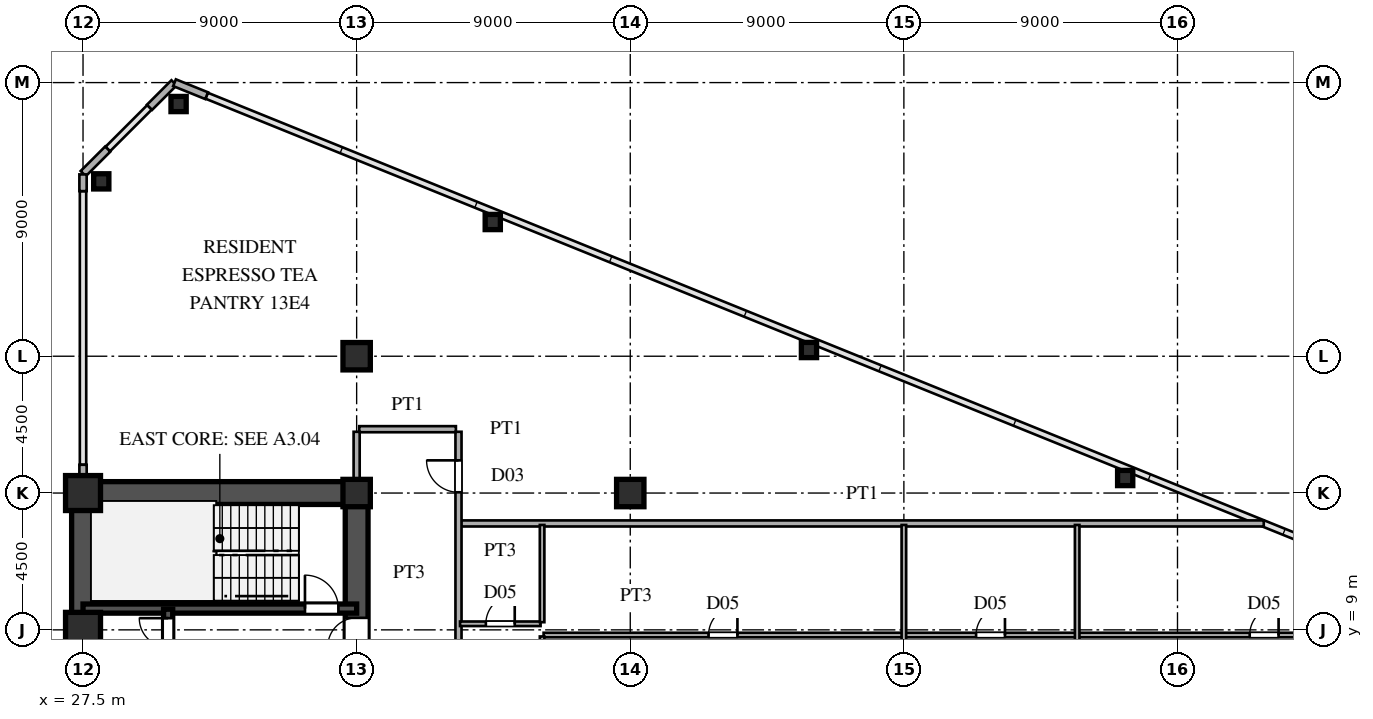
"""IFC4 building model, lengths in metres.
Left out: names, types, materials, properties, quantities, classifications, styles, units other than length and angle.
Written with IfcOpenShell. Run it as: python <this file> out.ifc"""

import sys

from ifc_helpers import new_model, si_unit, direction, frame, frame_2d, origin, origin_2d, place, context, subcontext, project, spatial, rectangle, hollow_rectangle, i_section, extrude, source, transform, mapped, element, fill, save


model = new_model("IFC4")
c1 = context("Model", 3, precision=1e-05, world=origin(), true_north=direction((0.0, 1.0)))
c2 = subcontext(c1, "Body", "Model", "MODEL_VIEW")
j1 = project(units=[si_unit("LENGTHUNIT", "METRE"), si_unit("PLANEANGLEUNIT", "RADIAN")], contexts=[c1])
p1 = place(None, origin())
s1 = spatial("IfcSite", under=j1, at=p1, CompositionType="ELEMENT")
p2 = place(p1, origin())
s2 = spatial("IfcBuilding", under=s1, at=p2, CompositionType="ELEMENT")
p3 = place(p2, frame((0.0, 0.0, 51.3)))
s3 = spatial("IfcBuildingStorey", under=s2, at=p3, CompositionType="ELEMENT", Elevation=51.3)
m1 = source(origin(), c2, "Body", "SweptSolid", [
    extrude(hollow_rectangle(XDim=1.15, YDim=1.15, WallThickness=0.048, at=origin_2d()), origin(), (0.0, 0.0, 1.0), 3.6),
])
for number, where, z_axis, x_axis in (
    (1, (27.5, 9.0, 0.0), (0.0, 0.0, 1.0), (1.0, 0.0, 0.0)),
    (2, (27.5, 13.5, 0.0), (0.0, 0.0, 1.0), (1.0, 0.0, 0.0)),
):
    element("IfcColumn", number, at=place(p3, frame(where, z_axis=z_axis, x_axis=x_axis)), inside=s3, PredefinedType="COLUMN", context=c2, shape_type="MappedRepresentation", body=[
        mapped(m1, transform((0.0, 0.0, 0.0), scale=1.0)),
    ])
m2 = source(origin(), c2, "Body", "SweptSolid", [
    extrude(i_section(OverallWidth=0.9, OverallDepth=0.9, WebThickness=0.036, FlangeThickness=0.055, at=origin_2d()), origin(), (0.0, 0.0, 1.0), 3.6),
])
for number, where, z_axis, x_axis in (
    (3, (36.5, 13.5, 0.0), (0.0, 0.0, 1.0), (1.0, 0.0, 0.0)),
    (4, (36.5, 18.0, 0.0), (0.0, 0.0, 1.0), (1.0, 0.0, 0.0)),
    (5, (45.5, 13.5, 0.0), (0.0, 0.0, 1.0), (1.0, 0.0, 0.0)),
):
    element("IfcColumn", number, at=place(p3, frame(where, z_axis=z_axis, x_axis=x_axis)), inside=s3, PredefinedType="COLUMN", context=c2, shape_type="MappedRepresentation", body=[
        mapped(m2, transform((0.0, 0.0, 0.0), scale=1.0)),
    ])
m3 = source(origin(), c2, "Body", "SweptSolid", [
    extrude(hollow_rectangle(XDim=0.5, YDim=0.5, WallThickness=0.02, at=origin_2d()), origin(), (0.0, 0.0, 1.0), 3.6),
])
for number, where, z_axis, x_axis in (
    (6, (30.643, 26.295, 0.0), (0.0, 0.0, 1.0), (1.0, 0.0, 0.0)),
    (7, (28.1, 23.751, 0.0), (0.0, 0.0, 1.0), (1.0, 0.0, 0.0)),
    (8, (40.977, 22.414, 0.0), (0.0, 0.0, 1.0), (1.0, 0.0, 0.0)),
    (9, (51.378, 18.204, 0.0), (0.0, 0.0, 1.0), (1.0, 0.0, 0.0)),
    (10, (61.779, 13.994, 0.0), (0.0, 0.0, 1.0), (1.0, 0.0, 0.0)),
):
    element("IfcColumn", number, at=place(p3, frame(where, z_axis=z_axis, x_axis=x_axis)), inside=s3, PredefinedType="COLUMN", context=c2, shape_type="MappedRepresentation", body=[
        mapped(m3, transform((0.0, 0.0, 0.0), scale=1.0)),
    ])
p4 = place(p3, frame((31.566, 26.569, 0.0), z_axis=(0.0, 0.0, 1.0), x_axis=(-0.927007103665, 0.375043770452, 0.0)))
e11 = element("IfcWall", 11, at=p4, inside=s3, PredefinedType="SOLIDWALL", context=c2, shape_type="SweptSolid", body=[
    extrude(rectangle(XDim=1.14, YDim=0.24, at=frame_2d((0.57, 0.0))), origin(), (0.0, 0.0, 1.0), 3.38),
])
for number, where, z_axis, x_axis in (
    (12, (30.493, 26.993, 0.0), (0.0, 0.0, 1.0), (-0.707, -0.707, 0.0)),
    (13, (28.313, 24.813, 0.0), (0.0, 0.0, 1.0), (-0.707, -0.707, 0.0)),
):
    element("IfcWall", number, at=place(p3, frame(where, z_axis=z_axis, x_axis=x_axis)), inside=s3, PredefinedType="SOLIDWALL", context=c2, shape_type="SweptSolid", body=[
        extrude(rectangle(XDim=1.14, YDim=0.24, at=frame_2d((0.57, 0.0))), origin(), (0.0, 0.0, 1.0), 3.38),
    ])
p5 = place(p3, frame((27.5, 13.88, 0.0), z_axis=(0.0, 0.0, 1.0), x_axis=(0.0, 1.0, 0.0)))
e14 = element("IfcWall", 14, at=p5, inside=s3, PredefinedType="SOLIDWALL", context=c2, shape_type="SweptSolid", body=[
    extrude(rectangle(XDim=0.55, YDim=0.24, at=frame_2d((0.275, 0.0))), origin(), (0.0, 0.0, 1.0), 2.88),
])
p6 = place(p3, frame((27.5, 23.43, 0.0), z_axis=(0.0, 0.0, 1.0), x_axis=(0.0, 1.0, 0.0)))
e15 = element("IfcWall", 15, at=p6, inside=s3, PredefinedType="SOLIDWALL", context=c2, shape_type="SweptSolid", body=[
    extrude(rectangle(XDim=0.55, YDim=0.24, at=frame_2d((0.275, 0.0))), origin(), (0.0, 0.0, 1.0), 3.38),
])
p7 = place(p3, frame((27.5, 1.3, 0.0), z_axis=(0.0, 0.0, 1.0), x_axis=(0.0, 1.0, 0.0)))
e16 = element("IfcWall", 16, at=p7, inside=s3, PredefinedType="SHEAR", context=c2, shape_type="SweptSolid", body=[
    extrude(rectangle(XDim=12.2, YDim=0.75, at=frame_2d((6.1, 0.0))), origin(), (0.0, 0.0, 1.0), 3.38),
])
p8 = place(p3, frame((27.5, 13.5, 0.0), z_axis=(0.0, 0.0, 1.0), x_axis=(1.0, 0.0, 0.0)))
e17 = element("IfcWall", 17, at=p8, inside=s3, PredefinedType="SHEAR", context=c2, shape_type="SweptSolid", body=[
    extrude(rectangle(XDim=9.0, YDim=0.75, at=frame_2d((4.5, 0.0))), origin(), (0.0, 0.0, 1.0), 3.38),
])
p9 = place(p3, frame((36.5, 8.2, 0.0), z_axis=(0.0, 0.0, 1.0), x_axis=(0.0, 1.0, 0.0)))
e18 = element("IfcWall", 18, at=p9, inside=s3, PredefinedType="SHEAR", context=c2, shape_type="SweptSolid", body=[
    extrude(rectangle(XDim=5.45, YDim=0.75, at=frame_2d((2.725, 0.0))), origin(), (0.0, 0.0, 1.0), 3.38),
])
p10 = place(p9, frame((0.245, 0.0, 0.0)))
e19 = element("IfcOpeningElement", 19, at=p10, cuts=e18, PredefinedType="OPENING", context=c2, shape_type="SweptSolid", body=[
    extrude(rectangle(XDim=0.95, YDim=2.15, at=frame_2d((0.475, 1.075))), frame((0.0, 0.385, 0.0), z_axis=(0.0, -1.0, 0.0), x_axis=(1.0, 0.0, 0.0)), (0.0, 0.0, 1.0), 0.77),
])
p11 = place(p3, frame((27.5, 9.7, 0.0), z_axis=(0.0, 0.0, 1.0), x_axis=(1.0, 0.0, 0.0)))
e20 = element("IfcWall", 20, at=p11, inside=s3, PredefinedType="SHEAR", context=c2, shape_type="SweptSolid", body=[
    extrude(rectangle(XDim=9.0, YDim=0.3, at=frame_2d((4.5, 0.0))), origin(), (0.0, 0.0, 1.0), 3.38),
])
p12 = place(p11, frame((7.3, 0.0, 0.0)))
e21 = element("IfcOpeningElement", 21, at=p12, cuts=e20, PredefinedType="OPENING", context=c2, shape_type="SweptSolid", body=[
    extrude(rectangle(XDim=1.1, YDim=2.2, at=frame_2d((0.55, 1.1))), frame((0.0, 0.16, 0.0), z_axis=(0.0, -1.0, 0.0), x_axis=(1.0, 0.0, 0.0)), (0.0, 0.0, 1.0), 0.32),
])
p13 = place(p3, frame((30.3, 8.15, 0.0), z_axis=(0.0, 0.0, 1.0), x_axis=(0.0, 1.0, 0.0)))
e22 = element("IfcWall", 22, at=p13, inside=s3, PredefinedType="SHEAR", context=c2, shape_type="SweptSolid", body=[
    extrude(rectangle(XDim=1.53, YDim=0.3, at=frame_2d((0.765, 0.0))), origin(), (0.0, 0.0, 1.0), 3.38),
])
p14 = place(p13, frame((0.285, 0.0, 0.0)))
e23 = element("IfcOpeningElement", 23, at=p14, cuts=e22, PredefinedType="OPENING", context=c2, shape_type="SweptSolid", body=[
    extrude(rectangle(XDim=0.95, YDim=2.15, at=frame_2d((0.475, 1.075))), frame((0.0, 0.16, 0.0), z_axis=(0.0, -1.0, 0.0), x_axis=(1.0, 0.0, 0.0)), (0.0, 0.0, 1.0), 0.32),
])
p15 = place(p3, frame((42.65, 8.83, 0.0), z_axis=(0.0, 0.0, 1.0), x_axis=(1.0, 0.0, 0.0)))
e24 = element("IfcWall", 24, at=p15, inside=s3, PredefinedType="PARTITIONING", context=c2, shape_type="SweptSolid", body=[
    extrude(rectangle(XDim=29.885, YDim=0.15, at=frame_2d((14.942, 0.0))), origin(), (0.0, 0.0, 1.0), 3.38),
])
p16 = place(p15, frame((5.425, 0.0, 0.0)))
e25 = element("IfcOpeningElement", 25, at=p16, cuts=e24, PredefinedType="OPENING", context=c2, shape_type="SweptSolid", body=[
    extrude(rectangle(XDim=0.95, YDim=2.15, at=frame_2d((0.475, 1.075))), frame((0.0, 0.085, 0.0), z_axis=(0.0, -1.0, 0.0), x_axis=(1.0, 0.0, 0.0)), (0.0, 0.0, 1.0), 0.17),
])
p17 = place(p15, frame((23.225, 0.0, 0.0)))
e26 = element("IfcOpeningElement", 26, at=p17, cuts=e24, PredefinedType="OPENING", context=c2, shape_type="SweptSolid", body=[
    extrude(rectangle(XDim=0.95, YDim=2.15, at=frame_2d((0.475, 1.075))), frame((0.0, 0.085, 0.0), z_axis=(0.0, -1.0, 0.0), x_axis=(1.0, 0.0, 0.0)), (0.0, 0.0, 1.0), 0.17),
])
p18 = place(p15, frame((14.225, 0.0, 0.0)))
e27 = element("IfcOpeningElement", 27, at=p18, cuts=e24, PredefinedType="OPENING", context=c2, shape_type="SweptSolid", body=[
    extrude(rectangle(XDim=0.95, YDim=2.15, at=frame_2d((0.475, 1.075))), frame((0.0, 0.085, 0.0), z_axis=(0.0, -1.0, 0.0), x_axis=(1.0, 0.0, 0.0)), (0.0, 0.0, 1.0), 0.17),
])
p19 = place(p3, frame((39.9, 9.2, 0.0), z_axis=(0.0, 0.0, 1.0), x_axis=(1.0, 0.0, 0.0)))
e28 = element("IfcWall", 28, at=p19, inside=s3, PredefinedType="PARTITIONING", context=c2, shape_type="SweptSolid", body=[
    extrude(rectangle(XDim=2.65, YDim=0.15, at=frame_2d((1.325, 0.0))), origin(), (0.0, 0.0, 1.0), 3.38),
])
p20 = place(p19, frame((0.85, 0.0, 0.0)))
e29 = element("IfcOpeningElement", 29, at=p20, cuts=e28, PredefinedType="OPENING", context=c2, shape_type="SweptSolid", body=[
    extrude(rectangle(XDim=0.95, YDim=2.15, at=frame_2d((0.475, 1.075))), frame((0.0, 0.085, 0.0), z_axis=(0.0, -1.0, 0.0), x_axis=(1.0, 0.0, 0.0)), (0.0, 0.0, 1.0), 0.17),
])
p21 = place(p3, frame((39.93, 12.5, 0.0), z_axis=(0.0, 0.0, 1.0), x_axis=(1.0, 0.0, 0.0)))
e30 = element("IfcWall", 30, at=p21, inside=s3, PredefinedType="PARTITIONING", context=c2, shape_type="SweptSolid", body=[
    extrude(rectangle(XDim=26.407, YDim=0.2, at=frame_2d((13.204, 0.0))), origin(), (0.0, 0.0, 1.0), 3.38),
])
p22 = place(p3, frame((36.585, 15.6, 0.0), z_axis=(0.0, 0.0, 1.0), x_axis=(1.0, 0.0, 0.0)))
e31 = element("IfcWall", 31, at=p22, inside=s3, PredefinedType="PARTITIONING", context=c2, shape_type="SweptSolid", body=[
    extrude(rectangle(XDim=3.18, YDim=0.2, at=frame_2d((1.59, 0.0))), origin(), (0.0, 0.0, 1.0), 3.38),
])
p23 = place(p3, frame((36.5, 13.88, 0.0), z_axis=(0.0, 0.0, 1.0), x_axis=(0.0, 1.0, 0.0)))
e32 = element("IfcWall", 32, at=p23, inside=s3, PredefinedType="PARTITIONING", context=c2, shape_type="SweptSolid", body=[
    extrude(rectangle(XDim=1.635, YDim=0.2, at=frame_2d((0.817, 0.0))), origin(), (0.0, 0.0, 1.0), 2.68),
])
p24 = place(p3, frame((39.85, -15.515, 0.0), z_axis=(0.0, 0.0, 1.0), x_axis=(0.0, 1.0, 0.0)))
e33 = element("IfcWall", 33, at=p24, inside=s3, PredefinedType="PARTITIONING", context=c2, shape_type="SweptSolid", body=[
    extrude(rectangle(XDim=31.03, YDim=0.2, at=frame_2d((15.515, 0.0))), origin(), (0.0, 0.0, 1.0), 3.38),
])
p25 = place(p24, frame((0.94, 0.0, 0.0)))
e34 = element("IfcOpeningElement", 34, at=p25, cuts=e33, PredefinedType="OPENING", context=c2, shape_type="SweptSolid", body=[
    extrude(rectangle(XDim=1.05, YDim=2.25, at=frame_2d((0.525, 1.125))), frame((0.0, 0.11, 0.0), z_axis=(0.0, -1.0, 0.0), x_axis=(1.0, 0.0, 0.0)), (0.0, 0.0, 1.0), 0.22),
])
p26 = place(p24, frame((9.28, 0.0, 0.0)))
e35 = element("IfcOpeningElement", 35, at=p26, cuts=e33, PredefinedType="OPENING", context=c2, shape_type="SweptSolid", body=[
    extrude(rectangle(XDim=1.05, YDim=2.25, at=frame_2d((0.525, 1.125))), frame((0.0, 0.11, 0.0), z_axis=(0.0, -1.0, 0.0), x_axis=(1.0, 0.0, 0.0)), (0.0, 0.0, 1.0), 0.22),
])
p27 = place(p24, frame((21.825, 0.0, 0.0)))
e36 = element("IfcOpeningElement", 36, at=p27, cuts=e33, PredefinedType="OPENING", context=c2, shape_type="SweptSolid", body=[
    extrude(rectangle(XDim=1.05, YDim=2.25, at=frame_2d((0.525, 1.125))), frame((0.0, 0.11, 0.0), z_axis=(0.0, -1.0, 0.0), x_axis=(1.0, 0.0, 0.0)), (0.0, 0.0, 1.0), 0.22),
])
p28 = place(p24, frame((29.04, 0.0, 0.0)))
e37 = element("IfcOpeningElement", 37, at=p28, cuts=e33, PredefinedType="OPENING", context=c2, shape_type="SweptSolid", body=[
    extrude(rectangle(XDim=1.05, YDim=2.25, at=frame_2d((0.525, 1.125))), frame((0.0, 0.11, 0.0), z_axis=(0.0, -1.0, 0.0), x_axis=(1.0, 0.0, 0.0)), (0.0, 0.0, 1.0), 0.22),
])
p29 = place(p3, frame((42.6, 5.217, 0.0), z_axis=(0.0, 0.0, 1.0), x_axis=(0.0, 1.0, 0.0)))
e38 = element("IfcWall", 38, at=p29, inside=s3, PredefinedType="PARTITIONING", context=c2, shape_type="SweptSolid", body=[
    extrude(rectangle(XDim=3.566, YDim=0.15, at=frame_2d((1.783, 0.0))), origin(), (0.0, 0.0, 1.0), 3.38),
])
p30 = place(p29, frame((1.308, 0.0, 0.0)))
e39 = element("IfcOpeningElement", 39, at=p30, cuts=e38, PredefinedType="OPENING", context=c2, shape_type="SweptSolid", body=[
    extrude(rectangle(XDim=0.95, YDim=2.15, at=frame_2d((0.475, 1.075))), frame((0.0, 0.085, 0.0), z_axis=(0.0, -1.0, 0.0), x_axis=(1.0, 0.0, 0.0)), (0.0, 0.0, 1.0), 0.17),
])
p31 = place(p3, frame((42.6, 9.252, 0.0), z_axis=(0.0, 0.0, 1.0), x_axis=(0.0, 1.0, 0.0)))
e40 = element("IfcWall", 40, at=p31, inside=s3, PredefinedType="PARTITIONING", context=c2, shape_type="SweptSolid", body=[
    extrude(rectangle(XDim=3.198, YDim=0.15, at=frame_2d((1.599, 0.0))), origin(), (0.0, 0.0, 1.0), 3.38),
])
p32 = place(p3, frame((54.5, -12.45, 0.0), z_axis=(0.0, 0.0, 1.0), x_axis=(0.0, 1.0, 0.0)))
e41 = element("IfcWall", 41, at=p32, inside=s3, PredefinedType="PARTITIONING", context=c2, shape_type="SweptSolid", body=[
    extrude(rectangle(XDim=24.9, YDim=0.15, at=frame_2d((12.45, 0.0))), origin(), (0.0, 0.0, 1.0), 2.68),
])
p33 = place(p32, frame((6.475, 0.0, 0.0)))
e42 = element("IfcOpeningElement", 42, at=p33, cuts=e41, PredefinedType="OPENING", context=c2, shape_type="SweptSolid", body=[
    extrude(rectangle(XDim=0.95, YDim=2.15, at=frame_2d((0.475, 1.075))), frame((0.0, 0.085, 0.0), z_axis=(0.0, -1.0, 0.0), x_axis=(1.0, 0.0, 0.0)), (0.0, 0.0, 1.0), 0.17),
])
p34 = place(p32, frame((18.975, 0.0, 0.0)))
e43 = element("IfcOpeningElement", 43, at=p34, cuts=e41, PredefinedType="OPENING", context=c2, shape_type="SweptSolid", body=[
    extrude(rectangle(XDim=0.95, YDim=2.15, at=frame_2d((0.475, 1.075))), frame((0.0, 0.085, 0.0), z_axis=(0.0, -1.0, 0.0), x_axis=(1.0, 0.0, 0.0)), (0.0, 0.0, 1.0), 0.17),
])
p35 = place(p3, frame((60.2, -12.45, 0.0), z_axis=(0.0, 0.0, 1.0), x_axis=(0.0, 1.0, 0.0)))
e44 = element("IfcWall", 44, at=p35, inside=s3, PredefinedType="PARTITIONING", context=c2, shape_type="SweptSolid", body=[
    extrude(rectangle(XDim=24.9, YDim=0.15, at=frame_2d((12.45, 0.0))), origin(), (0.0, 0.0, 1.0), 3.38),
])
p36 = place(p35, frame((1.808, 0.0, 0.0)))
e45 = element("IfcOpeningElement", 45, at=p36, cuts=e44, PredefinedType="OPENING", context=c2, shape_type="SweptSolid", body=[
    extrude(rectangle(XDim=0.95, YDim=2.15, at=frame_2d((0.475, 1.075))), frame((0.0, 0.085, 0.0), z_axis=(0.0, -1.0, 0.0), x_axis=(1.0, 0.0, 0.0)), (0.0, 0.0, 1.0), 0.17),
])
p37 = place(p35, frame((6.475, 0.0, 0.0)))
e46 = element("IfcOpeningElement", 46, at=p37, cuts=e44, PredefinedType="OPENING", context=c2, shape_type="SweptSolid", body=[
    extrude(rectangle(XDim=0.95, YDim=2.15, at=frame_2d((0.475, 1.075))), frame((0.0, 0.085, 0.0), z_axis=(0.0, -1.0, 0.0), x_axis=(1.0, 0.0, 0.0)), (0.0, 0.0, 1.0), 0.17),
])
p38 = place(p35, frame((11.142, 0.0, 0.0)))
e47 = element("IfcOpeningElement", 47, at=p38, cuts=e44, PredefinedType="OPENING", context=c2, shape_type="SweptSolid", body=[
    extrude(rectangle(XDim=0.95, YDim=2.15, at=frame_2d((0.475, 1.075))), frame((0.0, 0.085, 0.0), z_axis=(0.0, -1.0, 0.0), x_axis=(1.0, 0.0, 0.0)), (0.0, 0.0, 1.0), 0.17),
])
p39 = place(p35, frame((15.308, 0.0, 0.0)))
e48 = element("IfcOpeningElement", 48, at=p39, cuts=e44, PredefinedType="OPENING", context=c2, shape_type="SweptSolid", body=[
    extrude(rectangle(XDim=0.95, YDim=2.15, at=frame_2d((0.475, 1.075))), frame((0.0, 0.085, 0.0), z_axis=(0.0, -1.0, 0.0), x_axis=(1.0, 0.0, 0.0)), (0.0, 0.0, 1.0), 0.17),
])
p40 = place(p35, frame((18.975, 0.0, 0.0)))
e49 = element("IfcOpeningElement", 49, at=p40, cuts=e44, PredefinedType="OPENING", context=c2, shape_type="SweptSolid", body=[
    extrude(rectangle(XDim=0.95, YDim=2.15, at=frame_2d((0.475, 1.075))), frame((0.0, 0.085, 0.0), z_axis=(0.0, -1.0, 0.0), x_axis=(1.0, 0.0, 0.0)), (0.0, 0.0, 1.0), 0.17),
])
m4 = source(origin(), c2, "Body", "SweptSolid", [
    extrude(rectangle(XDim=0.95, YDim=2.15, at=frame_2d((0.475, 1.075))), frame((0.0, 0.025, 0.0), z_axis=(0.0, -1.0, 0.0), x_axis=(1.0, 0.0, 0.0)), (0.0, 0.0, 1.0), 0.05),
])
p41 = place(p10, origin())
e50 = element("IfcDoor", 50, at=p41, inside=s3, OperationType="SINGLE_SWING_LEFT", PredefinedType="DOOR", context=c2, shape_type="MappedRepresentation", body=[
    mapped(m4, transform((0.0, 0.0, 0.0), scale=1.0)),
])
fill(e19, e50)
m5 = source(origin(), c2, "Body", "SweptSolid", [
    extrude(rectangle(XDim=1.1, YDim=2.2, at=frame_2d((0.55, 1.1))), frame((0.0, 0.025, 0.0), z_axis=(0.0, -1.0, 0.0), x_axis=(1.0, 0.0, 0.0)), (0.0, 0.0, 1.0), 0.05),
])
p42 = place(p12, origin())
e51 = element("IfcDoor", 51, at=p42, inside=s3, OperationType="SINGLE_SWING_LEFT", PredefinedType="DOOR", context=c2, shape_type="MappedRepresentation", body=[
    mapped(m5, transform((0.0, 0.0, 0.0), scale=1.0)),
])
fill(e21, e51)
p43 = place(p14, origin())
e52 = element("IfcDoor", 52, at=p43, inside=s3, OperationType="SINGLE_SWING_RIGHT", PredefinedType="DOOR", context=c2, shape_type="MappedRepresentation", body=[
    mapped(m4, transform((0.0, 0.0, 0.0), scale=1.0)),
])
fill(e23, e52)
m6 = source(origin(), c2, "Body", "SweptSolid", [
    extrude(rectangle(XDim=0.95, YDim=2.15, at=frame_2d((0.475, 1.075))), frame((0.0, 0.025, 0.0), z_axis=(0.0, -1.0, 0.0), x_axis=(1.0, 0.0, 0.0)), (0.0, 0.0, 1.0), 0.05),
])
p44 = place(p16, origin())
e53 = element("IfcDoor", 53, at=p44, inside=s3, OperationType="SINGLE_SWING_RIGHT", PredefinedType="DOOR", context=c2, shape_type="MappedRepresentation", body=[
    mapped(m6, transform((0.0, 0.0, 0.0), scale=1.0)),
])
fill(e25, e53)
p45 = place(p17, origin())
e54 = element("IfcDoor", 54, at=p45, inside=s3, OperationType="SINGLE_SWING_RIGHT", PredefinedType="DOOR", context=c2, shape_type="MappedRepresentation", body=[
    mapped(m6, transform((0.0, 0.0, 0.0), scale=1.0)),
])
fill(e26, e54)
p46 = place(p18, origin())
e55 = element("IfcDoor", 55, at=p46, inside=s3, OperationType="SINGLE_SWING_RIGHT", PredefinedType="DOOR", context=c2, shape_type="MappedRepresentation", body=[
    mapped(m6, transform((0.0, 0.0, 0.0), scale=1.0)),
])
fill(e27, e55)
p47 = place(p20, origin())
e56 = element("IfcDoor", 56, at=p47, inside=s3, OperationType="SINGLE_SWING_RIGHT", PredefinedType="DOOR", context=c2, shape_type="MappedRepresentation", body=[
    mapped(m6, transform((0.0, 0.0, 0.0), scale=1.0)),
])
fill(e29, e56)
m7 = source(origin(), c2, "Body", "SweptSolid", [
    extrude(rectangle(XDim=1.05, YDim=2.25, at=frame_2d((0.525, 1.125))), frame((0.0, 0.025, 0.0), z_axis=(0.0, -1.0, 0.0), x_axis=(1.0, 0.0, 0.0)), (0.0, 0.0, 1.0), 0.05),
])
p48 = place(p28, origin())
e57 = element("IfcDoor", 57, at=p48, inside=s3, OperationType="SINGLE_SWING_RIGHT", PredefinedType="DOOR", context=c2, shape_type="MappedRepresentation", body=[
    mapped(m7, transform((0.0, 0.0, 0.0), scale=1.0)),
])
fill(e37, e57)
save(model, sys.argv[1])
